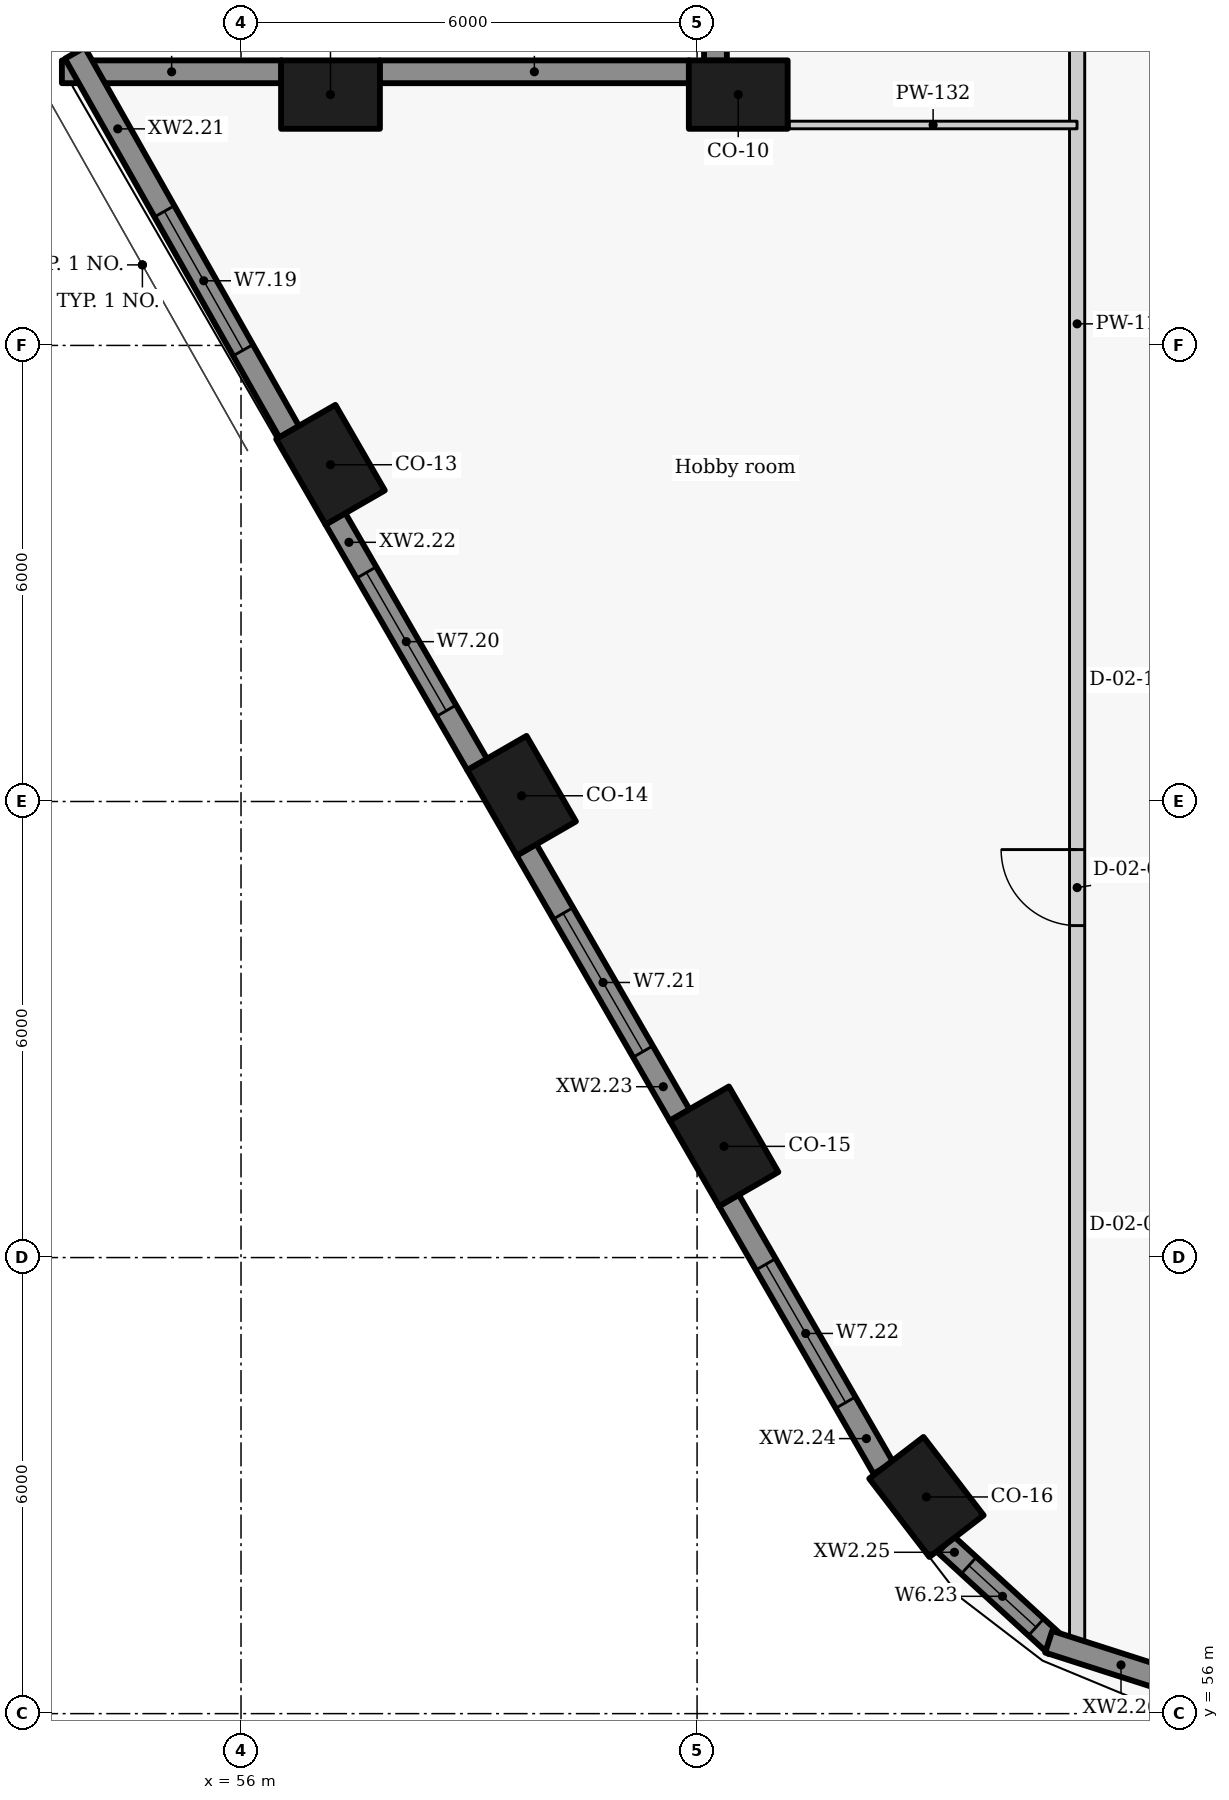
"""IFC4 building model, lengths in metres.
Left out: names, types, materials, properties, quantities, classifications, styles, units other than length and angle.
Written with IfcOpenShell. Run it as: python <this file> out.ifc"""

import sys

from ifc_helpers import new_model, si_unit, direction, frame, frame_2d, origin, origin_2d, place, context, subcontext, project, spatial, rectangle, extrude, element, fill, save


model = new_model("IFC4")
c1 = context("Model", 3, precision=1e-05, world=origin(), true_north=direction((0.0, 1.0)))
c2 = subcontext(c1, "Body", "Model", "MODEL_VIEW")
j1 = project(units=[si_unit("LENGTHUNIT", "METRE"), si_unit("PLANEANGLEUNIT", "RADIAN")], contexts=[c1])
p1 = place(None, origin())
s1 = spatial("IfcSite", under=j1, at=p1, CompositionType="ELEMENT")
p2 = place(p1, origin())
s2 = spatial("IfcBuilding", under=s1, at=p2, CompositionType="ELEMENT")
p3 = place(p2, frame((0.0, 0.0, 127.2)))
s3 = spatial("IfcBuildingStorey", under=s2, at=p3, CompositionType="ELEMENT", Elevation=127.2)
for number, where, z_axis, x_axis in (
    (1, (62.542, 77.3, 0.0), (0.0, 0.0, 1.0), (-1.0, 0.0, 0.0)),
    (2, (57.177, 77.3, 0.0), (0.0, 0.0, 1.0), (-1.0, 0.0, 0.0)),
    (3, (57.177, 72.43, 0.0), (0.0, 0.0, 1.0), (0.5, -0.866, 0.0)),
    (4, (59.692, 68.075, 0.0), (0.0, 0.0, 1.0), (0.5, -0.866, 0.0)),
    (5, (62.354, 63.463, 0.0), (0.0, 0.0, 1.0), (0.5, -0.866, 0.0)),
    (6, (65.018, 58.851, 0.0), (0.0, 0.0, 1.0), (0.609, -0.793, 0.0)),
):
    element("IfcColumn", number, at=place(p3, frame(where, z_axis=z_axis, x_axis=x_axis)), inside=s3, PredefinedType="COLUMN", context=c2, shape_type="SweptSolid", body=[
        extrude(rectangle(XDim=1.3, YDim=0.9, at=origin_2d()), origin(), (0.0, 0.0, 1.0), 3.3),
    ])
p4 = place(p3, frame((62.242, 82.054, 0.0), z_axis=(0.0, 0.0, 1.0), x_axis=(0.0, -1.0, 0.0)))
e7 = element("IfcWall", 7, at=p4, inside=s3, PredefinedType="SOLIDWALL", context=c2, shape_type="SweptSolid", body=[
    extrude(rectangle(XDim=4.308, YDim=0.3, at=frame_2d((2.154, 0.0))), origin(), (0.0, 0.0, 1.0), 2.425),
])
p5 = place(p4, frame((1.104, 0.0, 0.9)))
e8 = element("IfcOpeningElement", 8, at=p5, cuts=e7, PredefinedType="OPENING", context=c2, shape_type="SweptSolid", body=[
    extrude(rectangle(XDim=2.1, YDim=1.1, at=frame_2d((1.05, 0.55))), frame((0.0, 0.16, 0.0), z_axis=(0.0, -1.0, 0.0), x_axis=(1.0, 0.0, 0.0)), (0.0, 0.0, 1.0), 0.32),
])
p6 = place(p3, frame((61.896, 77.6, 0.0), z_axis=(0.0, 0.0, 1.0), x_axis=(-1.0, 0.0, 0.0)))
e9 = element("IfcWall", 9, at=p6, inside=s3, PredefinedType="SOLIDWALL", context=c2, shape_type="SweptSolid", body=[
    extrude(rectangle(XDim=4.073, YDim=0.3, at=frame_2d((2.036, 0.0))), origin(), (0.0, 0.0, 1.0), 2.425),
])
p7 = place(p3, frame((56.531, 77.6, 0.0), z_axis=(0.0, 0.0, 1.0), x_axis=(-1.0, 0.0, 0.0)))
e10 = element("IfcWall", 10, at=p7, inside=s3, PredefinedType="SOLIDWALL", context=c2, shape_type="SweptSolid", body=[
    extrude(rectangle(XDim=2.888, YDim=0.3, at=frame_2d((1.444, 0.0))), origin(), (0.0, 0.0, 1.0), 2.425),
])
p8 = place(p3, frame((53.814, 77.847, 0.0), z_axis=(0.0, 0.0, 1.0), x_axis=(0.492498306264, -0.87031340236, 0.0)))
e11 = element("IfcWall", 11, at=p8, inside=s3, PredefinedType="SOLIDWALL", context=c2, shape_type="SweptSolid", body=[
    extrude(rectangle(XDim=5.727, YDim=0.3, at=frame_2d((2.863, 0.0))), origin(), (0.0, 0.0, 1.0), 2.425),
])
p9 = place(p8, frame((2.392, 0.0, 0.9)))
e12 = element("IfcOpeningElement", 12, at=p9, cuts=e11, PredefinedType="OPENING", context=c2, shape_type="SweptSolid", body=[
    extrude(rectangle(XDim=2.1, YDim=1.1, at=frame_2d((1.05, 0.55))), frame((0.0, 0.16, 0.0), z_axis=(0.0, -1.0, 0.0), x_axis=(1.0, 0.0, 0.0)), (0.0, 0.0, 1.0), 0.32),
])
p10 = place(p3, frame((57.24, 71.721, 0.0), z_axis=(0.0, 0.0, 1.0), x_axis=(0.499933594891, -0.866063739398, 0.0)))
e13 = element("IfcWall", 13, at=p10, inside=s3, PredefinedType="SOLIDWALL", context=c2, shape_type="SweptSolid", body=[
    extrude(rectangle(XDim=3.737, YDim=0.3, at=frame_2d((1.868, 0.0))), origin(), (0.0, 0.0, 1.0), 2.425),
])
p11 = place(p10, frame((0.818, 0.0, 0.9)))
e14 = element("IfcOpeningElement", 14, at=p11, cuts=e13, PredefinedType="OPENING", context=c2, shape_type="SweptSolid", body=[
    extrude(rectangle(XDim=2.1, YDim=1.1, at=frame_2d((1.05, 0.55))), frame((0.0, 0.16, 0.0), z_axis=(0.0, -1.0, 0.0), x_axis=(1.0, 0.0, 0.0)), (0.0, 0.0, 1.0), 0.32),
])
p12 = place(p3, frame((59.755, 67.366, 0.0), z_axis=(0.0, 0.0, 1.0), x_axis=(0.500031546601, -0.86600718958, 0.0)))
e15 = element("IfcWall", 15, at=p12, inside=s3, PredefinedType="SOLIDWALL", context=c2, shape_type="SweptSolid", body=[
    extrude(rectangle(XDim=4.034, YDim=0.3, at=frame_2d((2.017, 0.0))), origin(), (0.0, 0.0, 1.0), 2.425),
])
p13 = place(p12, frame((0.967, 0.0, 0.9)))
e16 = element("IfcOpeningElement", 16, at=p13, cuts=e15, PredefinedType="OPENING", context=c2, shape_type="SweptSolid", body=[
    extrude(rectangle(XDim=2.1, YDim=1.1, at=frame_2d((1.05, 0.55))), frame((0.0, 0.16, 0.0), z_axis=(0.0, -1.0, 0.0), x_axis=(1.0, 0.0, 0.0)), (0.0, 0.0, 1.0), 0.32),
])
p14 = place(p3, frame((62.418, 62.753, 0.0), z_axis=(0.0, 0.0, 1.0), x_axis=(0.500018589245, -0.866014671013, 0.0)))
e17 = element("IfcWall", 17, at=p14, inside=s3, PredefinedType="SOLIDWALL", context=c2, shape_type="SweptSolid", body=[
    extrude(rectangle(XDim=4.068, YDim=0.3, at=frame_2d((2.034, 0.0))), origin(), (0.0, 0.0, 1.0), 2.425),
])
p15 = place(p14, frame((0.973, 0.0, 0.9)))
e18 = element("IfcOpeningElement", 18, at=p15, cuts=e17, PredefinedType="OPENING", context=c2, shape_type="SweptSolid", body=[
    extrude(rectangle(XDim=2.1, YDim=1.1, at=frame_2d((1.05, 0.55))), frame((0.0, 0.16, 0.0), z_axis=(0.0, -1.0, 0.0), x_axis=(1.0, 0.0, 0.0)), (0.0, 0.0, 1.0), 0.32),
])
p16 = place(p3, frame((65.269, 58.229, 0.0), z_axis=(0.0, 0.0, 1.0), x_axis=(0.737487298625, -0.675361002995, 0.0)))
e19 = element("IfcWall", 19, at=p16, inside=s3, PredefinedType="SOLIDWALL", context=c2, shape_type="SweptSolid", body=[
    extrude(rectangle(XDim=1.977, YDim=0.3, at=frame_2d((0.988, 0.0))), origin(), (0.0, 0.0, 1.0), 2.425),
])
p17 = place(p16, frame((0.416, 0.0, 0.9)))
e20 = element("IfcOpeningElement", 20, at=p17, cuts=e19, PredefinedType="OPENING", context=c2, shape_type="SweptSolid", body=[
    extrude(rectangle(XDim=1.2, YDim=1.1, at=frame_2d((0.6, 0.55))), frame((0.0, 0.16, 0.0), z_axis=(0.0, -1.0, 0.0), x_axis=(1.0, 0.0, 0.0)), (0.0, 0.0, 1.0), 0.32),
])
p18 = place(p3, frame((66.626, 56.946, 0.0), z_axis=(0.0, 0.0, 1.0), x_axis=(0.952201240673, -0.305471434444, 0.0)))
e21 = element("IfcWall", 21, at=p18, inside=s3, PredefinedType="SOLIDWALL", context=c2, shape_type="SweptSolid", body=[
    extrude(rectangle(XDim=1.999, YDim=0.3, at=frame_2d((1.0, 0.0))), origin(), (0.0, 0.0, 1.0), 2.425),
])
p19 = place(p3, frame((67.0, 56.833, 0.0), z_axis=(0.0, 0.0, 1.0), x_axis=(0.0, 1.0, 0.0)))
e22 = element("IfcWall", 22, at=p19, inside=s3, PredefinedType="PARTITIONING", context=c2, shape_type="SweptSolid", body=[
    extrude(rectangle(XDim=45.661, YDim=0.2, at=frame_2d((22.831, 0.0))), origin(), (0.0, 0.0, 1.0), 2.405),
])
p20 = place(p19, frame((9.534, 0.0, 0.0)))
e23 = element("IfcOpeningElement", 23, at=p20, cuts=e22, PredefinedType="OPENING", context=c2, shape_type="SweptSolid", body=[
    extrude(rectangle(XDim=1.0, YDim=2.1, at=frame_2d((0.5, 1.05))), frame((0.0, 0.11, 0.0), z_axis=(0.0, -1.0, 0.0), x_axis=(1.0, 0.0, 0.0)), (0.0, 0.0, 1.0), 0.22),
])
p21 = place(p19, frame((24.367, 0.0, 0.0)))
e24 = element("IfcOpeningElement", 24, at=p21, cuts=e22, PredefinedType="OPENING", context=c2, shape_type="SweptSolid", body=[
    extrude(rectangle(XDim=1.0, YDim=2.1, at=frame_2d((0.5, 1.05))), frame((0.0, 0.11, 0.0), z_axis=(0.0, -1.0, 0.0), x_axis=(1.0, 0.0, 0.0)), (0.0, 0.0, 1.0), 0.22),
])
p22 = place(p19, frame((36.7, 0.0, 0.0)))
e25 = element("IfcOpeningElement", 25, at=p22, cuts=e22, PredefinedType="OPENING", context=c2, shape_type="SweptSolid", body=[
    extrude(rectangle(XDim=1.0, YDim=2.1, at=frame_2d((0.5, 1.05))), frame((0.0, 0.11, 0.0), z_axis=(0.0, -1.0, 0.0), x_axis=(1.0, 0.0, 0.0)), (0.0, 0.0, 1.0), 0.22),
])
p23 = place(p19, frame((41.328, 0.0, 0.0)))
e26 = element("IfcOpeningElement", 26, at=p23, cuts=e22, PredefinedType="OPENING", context=c2, shape_type="SweptSolid", body=[
    extrude(rectangle(XDim=1.0, YDim=2.1, at=frame_2d((0.5, 1.05))), frame((0.0, 0.11, 0.0), z_axis=(0.0, -1.0, 0.0), x_axis=(1.0, 0.0, 0.0)), (0.0, 0.0, 1.0), 0.22),
])
p24 = place(p3, frame((63.212, 76.9, 0.0), z_axis=(0.0, 0.0, 1.0), x_axis=(1.0, 0.0, 0.0)))
e27 = element("IfcWall", 27, at=p24, inside=s3, PredefinedType="PARTITIONING", context=c2, shape_type="SweptSolid", body=[
    extrude(rectangle(XDim=3.787, YDim=0.1, at=frame_2d((1.894, 0.0))), origin(), (0.0, 0.0, 1.0), 3.025),
])
p25 = place(p9, origin())
e28 = element("IfcWindow", 28, at=p25, inside=s3, PartitioningType="SINGLE_PANEL", PredefinedType="WINDOW", context=c2, shape_type="SweptSolid", body=[
    extrude(rectangle(XDim=2.1, YDim=1.1, at=frame_2d((1.05, 0.55))), frame((0.0, 0.03, 0.0), z_axis=(0.0, -1.0, 0.0), x_axis=(1.0, 0.0, 0.0)), (0.0, 0.0, 1.0), 0.06),
])
fill(e12, e28)
p26 = place(p11, origin())
e29 = element("IfcWindow", 29, at=p26, inside=s3, PartitioningType="SINGLE_PANEL", PredefinedType="WINDOW", context=c2, shape_type="SweptSolid", body=[
    extrude(rectangle(XDim=2.1, YDim=1.1, at=frame_2d((1.05, 0.55))), frame((0.0, 0.03, 0.0), z_axis=(0.0, -1.0, 0.0), x_axis=(1.0, 0.0, 0.0)), (0.0, 0.0, 1.0), 0.06),
])
fill(e14, e29)
p27 = place(p13, origin())
e30 = element("IfcWindow", 30, at=p27, inside=s3, PartitioningType="SINGLE_PANEL", PredefinedType="WINDOW", context=c2, shape_type="SweptSolid", body=[
    extrude(rectangle(XDim=2.1, YDim=1.1, at=frame_2d((1.05, 0.55))), frame((0.0, 0.03, 0.0), z_axis=(0.0, -1.0, 0.0), x_axis=(1.0, 0.0, 0.0)), (0.0, 0.0, 1.0), 0.06),
])
fill(e16, e30)
p28 = place(p15, origin())
e31 = element("IfcWindow", 31, at=p28, inside=s3, PartitioningType="SINGLE_PANEL", PredefinedType="WINDOW", context=c2, shape_type="SweptSolid", body=[
    extrude(rectangle(XDim=2.1, YDim=1.1, at=frame_2d((1.05, 0.55))), frame((0.0, 0.03, 0.0), z_axis=(0.0, -1.0, 0.0), x_axis=(1.0, 0.0, 0.0)), (0.0, 0.0, 1.0), 0.06),
])
fill(e18, e31)
p29 = place(p17, origin())
e32 = element("IfcWindow", 32, at=p29, inside=s3, PartitioningType="SINGLE_PANEL", PredefinedType="WINDOW", context=c2, shape_type="SweptSolid", body=[
    extrude(rectangle(XDim=1.2, YDim=1.1, at=frame_2d((0.6, 0.55))), frame((0.0, 0.03, 0.0), z_axis=(0.0, -1.0, 0.0), x_axis=(1.0, 0.0, 0.0)), (0.0, 0.0, 1.0), 0.06),
])
fill(e20, e32)
p30 = place(p20, origin())
e33 = element("IfcDoor", 33, at=p30, inside=s3, OperationType="SINGLE_SWING_RIGHT", PredefinedType="DOOR", context=c2, shape_type="SweptSolid", body=[
    extrude(rectangle(XDim=1.0, YDim=2.1, at=frame_2d((0.5, 1.05))), frame((0.0, 0.025, 0.0), z_axis=(0.0, -1.0, 0.0), x_axis=(1.0, 0.0, 0.0)), (0.0, 0.0, 1.0), 0.05),
])
fill(e23, e33)
save(model, sys.argv[1])
